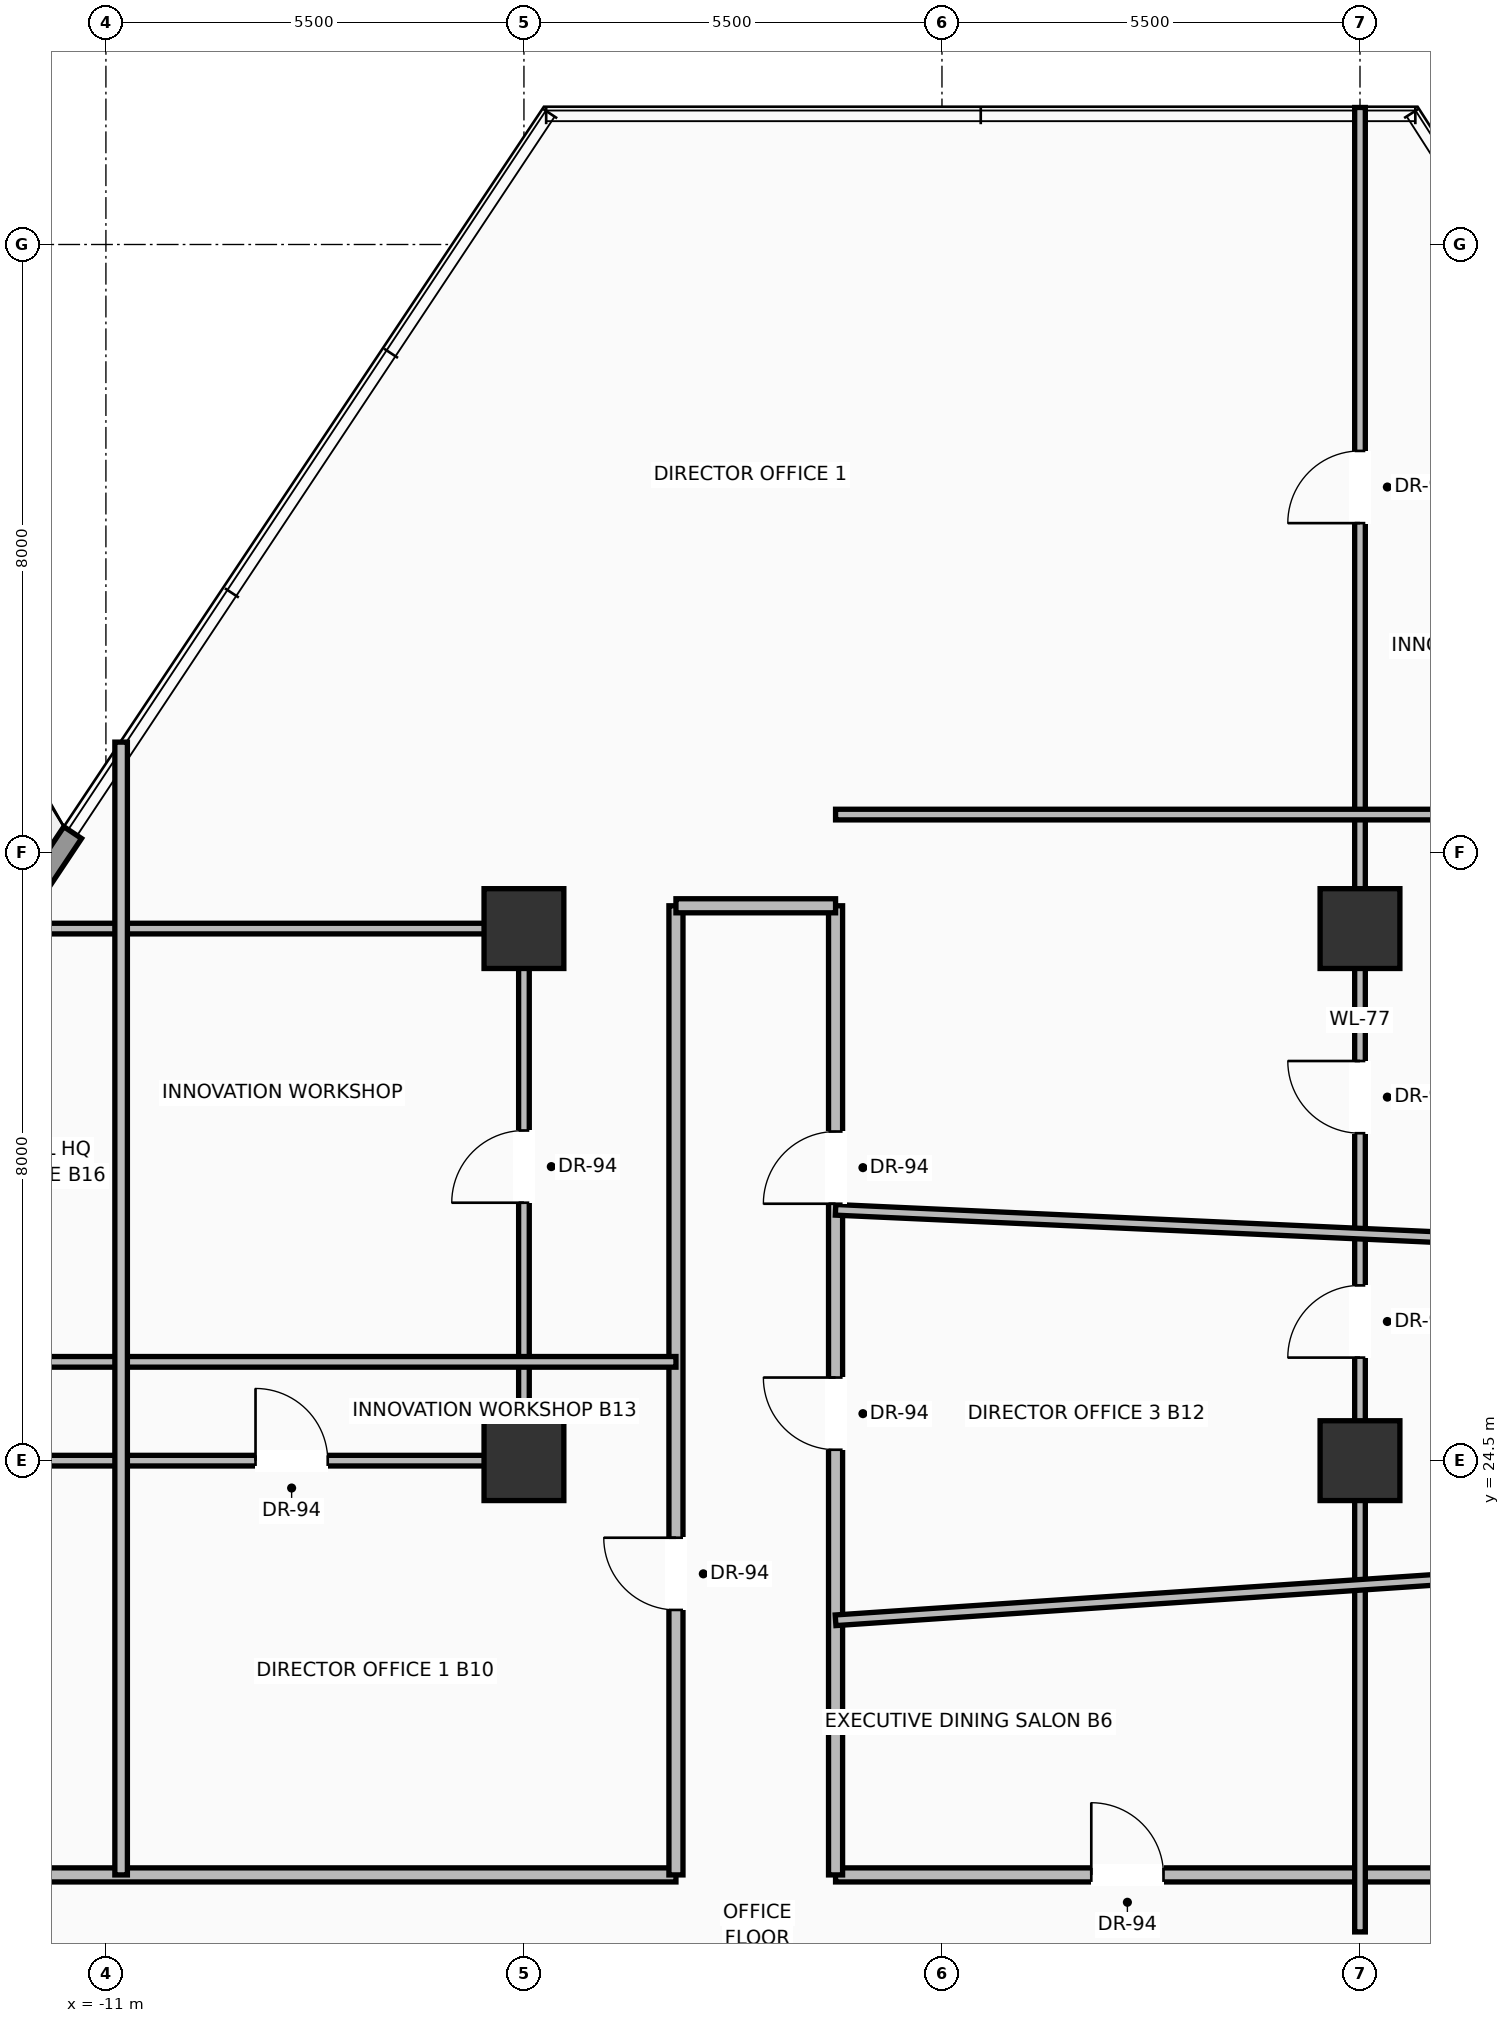
"""IFC4 building model, lengths in metres.
Left out: names, types, materials, properties, quantities, classifications, styles, units other than length and angle.
Written with IfcOpenShell. Run it as: python <this file> out.ifc"""

import sys

from ifc_helpers import new_model, si_unit, direction, frame, frame_2d, origin, origin_2d, place, context, subcontext, project, spatial, rectangle, extrude, source, transform, mapped, element, fill, save


model = new_model("IFC4")
c1 = context("Model", 3, precision=1e-05, world=origin(), true_north=direction((0.0, 1.0)))
c2 = subcontext(c1, "Body", "Model", "MODEL_VIEW")
j1 = project(units=[si_unit("LENGTHUNIT", "METRE"), si_unit("PLANEANGLEUNIT", "RADIAN")], contexts=[c1])
p1 = place(None, origin())
s1 = spatial("IfcSite", under=j1, at=p1, CompositionType="ELEMENT")
p2 = place(p1, origin())
s2 = spatial("IfcBuilding", under=s1, at=p2, CompositionType="ELEMENT")
p3 = place(p2, frame((0.0, 0.0, 109.9)))
s3 = spatial("IfcBuildingStorey", under=s2, at=p3, CompositionType="ELEMENT", Elevation=109.9)
m1 = source(origin(), c2, "Body", "SweptSolid", [
    extrude(rectangle(XDim=1.05, YDim=1.05, at=origin_2d()), origin(), (0.0, 0.0, 1.0), 3.7),
])
for number, where, z_axis, x_axis in (
    (1, (-5.5, 24.5, 0.0), (0.0, 0.0, 1.0), (1.0, 0.0, 0.0)),
    (2, (5.5, 24.5, 0.0), (0.0, 0.0, 1.0), (1.0, 0.0, 0.0)),
    (3, (-5.5, 31.5, 0.0), (0.0, 0.0, 1.0), (1.0, 0.0, 0.0)),
    (4, (5.5, 31.5, 0.0), (0.0, 0.0, 1.0), (1.0, 0.0, 0.0)),
):
    element("IfcColumn", number, at=place(p3, frame(where, z_axis=z_axis, x_axis=x_axis)), inside=s3, PredefinedType="COLUMN", context=c2, shape_type="MappedRepresentation", body=[
        mapped(m1, transform((0.0, 0.0, 0.0), scale=1.0)),
    ])
p4 = place(p3, frame((-21.363, 17.879, 0.0), z_axis=(0.0, 0.0, 1.0), x_axis=(0.554797817256, 0.831985205378, 0.0)))
e5 = element("IfcWall", 5, at=p4, inside=s3, PredefinedType="SOLIDWALL", context=c2, shape_type="SweptSolid", body=[
    extrude(rectangle(XDim=17.89, YDim=0.28, at=frame_2d((8.945, 0.0))), origin(), (0.0, 0.0, 1.0), 3.03),
])
p5 = place(p4, frame((4.294, 0.0, 0.0)))
e6 = element("IfcOpeningElement", 6, at=p5, cuts=e5, PredefinedType="OPENING", context=c2, shape_type="SweptSolid", body=[
    extrude(rectangle(XDim=1.6, YDim=2.35, at=frame_2d((0.8, 1.175))), frame((0.0, 0.15, 0.0), z_axis=(0.0, -1.0, 0.0), x_axis=(1.0, 0.0, 0.0)), (0.0, 0.0, 1.0), 0.3),
])
p6 = place(p4, frame((12.165, 0.0, 0.9)))
e7 = element("IfcOpeningElement", 7, at=p6, cuts=e5, PredefinedType="OPENING", context=c2, shape_type="SweptSolid", body=[
    extrude(rectangle(XDim=1.55, YDim=1.85, at=frame_2d((0.775, 0.925))), frame((0.0, 0.15, 0.0), z_axis=(0.0, -1.0, 0.0), x_axis=(1.0, 0.0, 0.0)), (0.0, 0.0, 1.0), 0.3),
])
p7 = place(p3, frame((-20.738, 19.05, 0.0), z_axis=(0.0, 0.0, 1.0), x_axis=(1.0, 0.0, 0.0)))
e8 = element("IfcWall", 8, at=p7, inside=s3, PredefinedType="PARTITIONING", context=c2, shape_type="SweptSolid", body=[
    extrude(rectangle(XDim=17.238, YDim=0.185, at=frame_2d((8.619, 0.0))), origin(), (0.0, 0.0, 1.0), 2.747),
])
p8 = place(p7, frame((7.316, 0.0, 0.0)))
e9 = element("IfcOpeningElement", 9, at=p8, cuts=e8, PredefinedType="OPENING", context=c2, shape_type="SweptSolid", body=[
    extrude(rectangle(XDim=0.95, YDim=2.2, at=frame_2d((0.475, 1.1))), frame((0.0, 0.103, 0.0), z_axis=(0.0, -1.0, 0.0), x_axis=(1.0, 0.0, 0.0)), (0.0, 0.0, 1.0), 0.205),
])
p9 = place(p3, frame((-1.4, 19.05, 0.0), z_axis=(0.0, 0.0, 1.0), x_axis=(1.0, 0.0, 0.0)))
e10 = element("IfcWall", 10, at=p9, inside=s3, PredefinedType="PARTITIONING", context=c2, shape_type="SweptSolid", body=[
    extrude(rectangle(XDim=22.597, YDim=0.185, at=frame_2d((11.299, 0.0))), origin(), (0.0, 0.0, 1.0), 2.747),
])
p10 = place(p9, frame((12.715, 0.0, 0.0)))
e11 = element("IfcOpeningElement", 11, at=p10, cuts=e10, PredefinedType="OPENING", context=c2, shape_type="SweptSolid", body=[
    extrude(rectangle(XDim=0.95, YDim=2.2, at=frame_2d((0.475, 1.1))), frame((0.0, 0.103, 0.0), z_axis=(0.0, -1.0, 0.0), x_axis=(1.0, 0.0, 0.0)), (0.0, 0.0, 1.0), 0.205),
])
p11 = place(p9, frame((3.365, 0.0, 0.0)))
e12 = element("IfcOpeningElement", 12, at=p11, cuts=e10, PredefinedType="OPENING", context=c2, shape_type="SweptSolid", body=[
    extrude(rectangle(XDim=0.95, YDim=2.2, at=frame_2d((0.475, 1.1))), frame((0.0, 0.103, 0.0), z_axis=(0.0, -1.0, 0.0), x_axis=(1.0, 0.0, 0.0)), (0.0, 0.0, 1.0), 0.205),
])
p12 = place(p9, frame((9.025, 0.0, 0.0)))
e13 = element("IfcOpeningElement", 13, at=p12, cuts=e10, PredefinedType="OPENING", context=c2, shape_type="SweptSolid", body=[
    extrude(rectangle(XDim=0.95, YDim=2.2, at=frame_2d((0.475, 1.1))), frame((0.0, 0.103, 0.0), z_axis=(0.0, -1.0, 0.0), x_axis=(1.0, 0.0, 0.0)), (0.0, 0.0, 1.0), 0.205),
])
p13 = place(p3, frame((-3.5, 19.05, 0.0), z_axis=(0.0, 0.0, 1.0), x_axis=(0.0, 1.0, 0.0)))
e14 = element("IfcWall", 14, at=p13, inside=s3, PredefinedType="PARTITIONING", context=c2, shape_type="SweptSolid", body=[
    extrude(rectangle(XDim=12.75, YDim=0.185, at=frame_2d((6.375, 0.0))), origin(), (0.0, 0.0, 1.0), 2.747),
])
p14 = place(p13, frame((3.486, 0.0, 0.0)))
e15 = element("IfcOpeningElement", 15, at=p14, cuts=e14, PredefinedType="OPENING", context=c2, shape_type="SweptSolid", body=[
    extrude(rectangle(XDim=0.95, YDim=2.2, at=frame_2d((0.475, 1.1))), frame((0.0, 0.103, 0.0), z_axis=(0.0, -1.0, 0.0), x_axis=(1.0, 0.0, 0.0)), (0.0, 0.0, 1.0), 0.205),
])
p15 = place(p3, frame((-1.4, 19.05, 0.0), z_axis=(0.0, 0.0, 1.0), x_axis=(0.0, 1.0, 0.0)))
e16 = element("IfcWall", 16, at=p15, inside=s3, PredefinedType="PARTITIONING", context=c2, shape_type="SweptSolid", body=[
    extrude(rectangle(XDim=12.75, YDim=0.185, at=frame_2d((6.375, 0.0))), origin(), (0.0, 0.0, 1.0), 2.747),
])
p16 = place(p15, frame((8.83, 0.0, 0.0)))
e17 = element("IfcOpeningElement", 17, at=p16, cuts=e16, PredefinedType="OPENING", context=c2, shape_type="SweptSolid", body=[
    extrude(rectangle(XDim=0.95, YDim=2.2, at=frame_2d((0.475, 1.1))), frame((0.0, 0.103, 0.0), z_axis=(0.0, -1.0, 0.0), x_axis=(1.0, 0.0, 0.0)), (0.0, 0.0, 1.0), 0.205),
])
p17 = place(p15, frame((5.594, 0.0, 0.0)))
e18 = element("IfcOpeningElement", 18, at=p17, cuts=e16, PredefinedType="OPENING", context=c2, shape_type="SweptSolid", body=[
    extrude(rectangle(XDim=0.95, YDim=2.2, at=frame_2d((0.475, 1.1))), frame((0.0, 0.103, 0.0), z_axis=(0.0, -1.0, 0.0), x_axis=(1.0, 0.0, 0.0)), (0.0, 0.0, 1.0), 0.205),
])
p18 = place(p3, frame((-3.5, 31.8, 0.0), z_axis=(0.0, 0.0, 1.0), x_axis=(1.0, 0.0, 0.0)))
e19 = element("IfcWall", 19, at=p18, inside=s3, PredefinedType="PARTITIONING", context=c2, shape_type="SweptSolid", body=[
    extrude(rectangle(XDim=2.1, YDim=0.185, at=frame_2d((1.05, 0.0))), origin(), (0.0, 0.0, 1.0), 2.747),
])
p19 = place(p3, frame((5.5, 18.3, 0.0), z_axis=(0.0, 0.0, 1.0), x_axis=(0.0, 1.0, 0.0)))
e20 = element("IfcWall", 20, at=p19, inside=s3, PredefinedType="PARTITIONING", context=c2, shape_type="SweptSolid", body=[
    extrude(rectangle(XDim=24.002, YDim=0.14, at=frame_2d((12.001, 0.0))), origin(), (0.0, 0.0, 1.0), 2.747),
])
p20 = place(p19, frame((10.508, 0.0, 0.0)))
e21 = element("IfcOpeningElement", 21, at=p20, cuts=e20, PredefinedType="OPENING", context=c2, shape_type="SweptSolid", body=[
    extrude(rectangle(XDim=0.95, YDim=2.2, at=frame_2d((0.475, 1.1))), frame((0.0, 0.08, 0.0), z_axis=(0.0, -1.0, 0.0), x_axis=(1.0, 0.0, 0.0)), (0.0, 0.0, 1.0), 0.16),
])
p21 = place(p19, frame((18.534, 0.0, 0.0)))
e22 = element("IfcOpeningElement", 22, at=p21, cuts=e20, PredefinedType="OPENING", context=c2, shape_type="SweptSolid", body=[
    extrude(rectangle(XDim=0.95, YDim=2.2, at=frame_2d((0.475, 1.1))), frame((0.0, 0.08, 0.0), z_axis=(0.0, -1.0, 0.0), x_axis=(1.0, 0.0, 0.0)), (0.0, 0.0, 1.0), 0.16),
])
p22 = place(p19, frame((7.556, 0.0, 0.0)))
e23 = element("IfcOpeningElement", 23, at=p22, cuts=e20, PredefinedType="OPENING", context=c2, shape_type="SweptSolid", body=[
    extrude(rectangle(XDim=0.95, YDim=2.2, at=frame_2d((0.475, 1.1))), frame((0.0, 0.08, 0.0), z_axis=(0.0, -1.0, 0.0), x_axis=(1.0, 0.0, 0.0)), (0.0, 0.0, 1.0), 0.16),
])
p23 = place(p3, frame((-17.104, 24.5, 0.0), z_axis=(0.0, 0.0, 1.0), x_axis=(1.0, 0.0, 0.0)))
e24 = element("IfcWall", 24, at=p23, inside=s3, PredefinedType="PARTITIONING", context=c2, shape_type="SweptSolid", body=[
    extrude(rectangle(XDim=11.604, YDim=0.14, at=frame_2d((5.802, 0.0))), origin(), (0.0, 0.0, 1.0), 2.747),
])
p24 = place(p23, frame((2.967, 0.0, 0.0)))
e25 = element("IfcOpeningElement", 25, at=p24, cuts=e24, PredefinedType="OPENING", context=c2, shape_type="SweptSolid", body=[
    extrude(rectangle(XDim=0.95, YDim=2.2, at=frame_2d((0.475, 1.1))), frame((0.0, 0.08, 0.0), z_axis=(0.0, -1.0, 0.0), x_axis=(1.0, 0.0, 0.0)), (0.0, 0.0, 1.0), 0.16),
])
p25 = place(p23, frame((8.072, 0.0, 0.0)))
e26 = element("IfcOpeningElement", 26, at=p25, cuts=e24, PredefinedType="OPENING", context=c2, shape_type="SweptSolid", body=[
    extrude(rectangle(XDim=0.95, YDim=2.2, at=frame_2d((0.475, 1.1))), frame((0.0, 0.08, 0.0), z_axis=(0.0, -1.0, 0.0), x_axis=(1.0, 0.0, 0.0)), (0.0, 0.0, 1.0), 0.16),
])
p26 = place(p3, frame((-5.5, 24.5, 0.0), z_axis=(0.0, 0.0, 1.0), x_axis=(0.0, 1.0, 0.0)))
e27 = element("IfcWall", 27, at=p26, inside=s3, PredefinedType="PARTITIONING", context=c2, shape_type="SweptSolid", body=[
    extrude(rectangle(XDim=7.0, YDim=0.14, at=frame_2d((3.5, 0.0))), origin(), (0.0, 0.0, 1.0), 2.747),
])
p27 = place(p26, frame((3.393, 0.0, 0.0)))
e28 = element("IfcOpeningElement", 28, at=p27, cuts=e27, PredefinedType="OPENING", context=c2, shape_type="SweptSolid", body=[
    extrude(rectangle(XDim=0.95, YDim=2.2, at=frame_2d((0.475, 1.1))), frame((0.0, 0.08, 0.0), z_axis=(0.0, -1.0, 0.0), x_axis=(1.0, 0.0, 0.0)), (0.0, 0.0, 1.0), 0.16),
])
p28 = place(p3, frame((-12.436, 31.5, 0.0), z_axis=(0.0, 0.0, 1.0), x_axis=(1.0, 0.0, 0.0)))
e29 = element("IfcWall", 29, at=p28, inside=s3, PredefinedType="PARTITIONING", context=c2, shape_type="SweptSolid", body=[
    extrude(rectangle(XDim=6.936, YDim=0.14, at=frame_2d((3.468, 0.0))), origin(), (0.0, 0.0, 1.0), 2.747),
])
p29 = place(p3, frame((-16.237, 25.8, 0.0), z_axis=(0.0, 0.0, 1.0), x_axis=(1.0, 0.0, 0.0)))
e30 = element("IfcWall", 30, at=p29, inside=s3, PredefinedType="PARTITIONING", context=c2, shape_type="SweptSolid", body=[
    extrude(rectangle(XDim=12.737, YDim=0.14, at=frame_2d((6.368, 0.0))), origin(), (0.0, 0.0, 1.0), 2.747),
])
p30 = place(p29, frame((2.574, 0.0, 0.0)))
e31 = element("IfcOpeningElement", 31, at=p30, cuts=e30, PredefinedType="OPENING", context=c2, shape_type="SweptSolid", body=[
    extrude(rectangle(XDim=0.95, YDim=2.2, at=frame_2d((0.475, 1.1))), frame((0.0, 0.08, 0.0), z_axis=(0.0, -1.0, 0.0), x_axis=(1.0, 0.0, 0.0)), (0.0, 0.0, 1.0), 0.16),
])
p31 = place(p3, frame((-1.4, 22.4, 0.0), z_axis=(0.0, 0.0, 1.0), x_axis=(0.997727357644, 0.067380411165, 0.0)))
e32 = element("IfcWall", 32, at=p31, inside=s3, PredefinedType="PARTITIONING", context=c2, shape_type="SweptSolid", body=[
    extrude(rectangle(XDim=19.638, YDim=0.14, at=frame_2d((9.819, 0.0))), origin(), (0.0, 0.0, 1.0), 2.747),
])
p32 = place(p31, frame((15.025, 0.0, 0.0)))
e33 = element("IfcOpeningElement", 33, at=p32, cuts=e32, PredefinedType="OPENING", context=c2, shape_type="SweptSolid", body=[
    extrude(rectangle(XDim=0.95, YDim=2.2, at=frame_2d((0.475, 1.1))), frame((0.0, 0.08, 0.0), z_axis=(0.0, -1.0, 0.0), x_axis=(1.0, 0.0, 0.0)), (0.0, 0.0, 1.0), 0.16),
])
p33 = place(p3, frame((-1.4, 27.8, 0.0), z_axis=(0.0, 0.0, 1.0), x_axis=(0.998969316616, -0.045390576782, 0.0)))
e34 = element("IfcWall", 34, at=p33, inside=s3, PredefinedType="PARTITIONING", context=c2, shape_type="SweptSolid", body=[
    extrude(rectangle(XDim=17.502, YDim=0.14, at=frame_2d((8.751, 0.0))), origin(), (0.0, 0.0, 1.0), 2.747),
])
p34 = place(p33, frame((13.905, 0.0, 0.0)))
e35 = element("IfcOpeningElement", 35, at=p34, cuts=e34, PredefinedType="OPENING", context=c2, shape_type="SweptSolid", body=[
    extrude(rectangle(XDim=0.95, YDim=2.2, at=frame_2d((0.475, 1.1))), frame((0.0, 0.08, 0.0), z_axis=(0.0, -1.0, 0.0), x_axis=(1.0, 0.0, 0.0)), (0.0, 0.0, 1.0), 0.16),
])
p35 = place(p3, frame((-1.4, 33.0, 0.0), z_axis=(0.0, 0.0, 1.0), x_axis=(1.0, 0.0, 0.0)))
e36 = element("IfcWall", 36, at=p35, inside=s3, PredefinedType="PARTITIONING", context=c2, shape_type="SweptSolid", body=[
    extrude(rectangle(XDim=13.631, YDim=0.14, at=frame_2d((6.816, 0.0))), origin(), (0.0, 0.0, 1.0), 2.747),
])
p36 = place(p3, frame((-10.8, 19.05, 0.0), z_axis=(0.0, 0.0, 1.0), x_axis=(0.0, 1.0, 0.0)))
e37 = element("IfcWall", 37, at=p36, inside=s3, PredefinedType="PARTITIONING", context=c2, shape_type="SweptSolid", body=[
    extrude(rectangle(XDim=14.903, YDim=0.165, at=frame_2d((7.452, 0.0))), origin(), (0.0, 0.0, 1.0), 2.747),
])
m2 = source(origin(), c2, "Body", "SweptSolid", [
    extrude(rectangle(XDim=0.95, YDim=2.2, at=frame_2d((0.475, 1.1))), frame((0.0, 0.025, 0.0), z_axis=(0.0, -1.0, 0.0), x_axis=(1.0, 0.0, 0.0)), (0.0, 0.0, 1.0), 0.05),
])
p37 = place(p14, origin())
e38 = element("IfcDoor", 38, at=p37, inside=s3, OperationType="SINGLE_SWING_RIGHT", PredefinedType="DOOR", context=c2, shape_type="MappedRepresentation", body=[
    mapped(m2, transform((0.0, 0.0, 0.0), scale=1.0)),
])
fill(e15, e38)
p38 = place(p16, origin())
e39 = element("IfcDoor", 39, at=p38, inside=s3, OperationType="SINGLE_SWING_LEFT", PredefinedType="DOOR", context=c2, shape_type="MappedRepresentation", body=[
    mapped(m2, transform((0.0, 0.0, 0.0), scale=1.0)),
])
fill(e17, e39)
p39 = place(p11, origin())
e40 = element("IfcDoor", 40, at=p39, inside=s3, OperationType="SINGLE_SWING_LEFT", PredefinedType="DOOR", context=c2, shape_type="MappedRepresentation", body=[
    mapped(m2, transform((0.0, 0.0, 0.0), scale=1.0)),
])
fill(e12, e40)
p40 = place(p17, origin())
e41 = element("IfcDoor", 41, at=p40, inside=s3, OperationType="SINGLE_SWING_RIGHT", PredefinedType="DOOR", context=c2, shape_type="MappedRepresentation", body=[
    mapped(m2, transform((0.0, 0.0, 0.0), scale=1.0)),
])
fill(e18, e41)
p41 = place(p25, origin())
e42 = element("IfcDoor", 42, at=p41, inside=s3, OperationType="SINGLE_SWING_LEFT", PredefinedType="DOOR", context=c2, shape_type="MappedRepresentation", body=[
    mapped(m2, transform((0.0, 0.0, 0.0), scale=1.0)),
])
fill(e26, e42)
p42 = place(p27, origin())
e43 = element("IfcDoor", 43, at=p42, inside=s3, OperationType="SINGLE_SWING_LEFT", PredefinedType="DOOR", context=c2, shape_type="MappedRepresentation", body=[
    mapped(m2, transform((0.0, 0.0, 0.0), scale=1.0)),
])
fill(e28, e43)
p43 = place(p20, origin())
e44 = element("IfcDoor", 44, at=p43, inside=s3, OperationType="SINGLE_SWING_RIGHT", PredefinedType="DOOR", context=c2, shape_type="MappedRepresentation", body=[
    mapped(m2, transform((0.0, 0.0, 0.0), scale=1.0)),
])
fill(e21, e44)
p44 = place(p21, origin())
e45 = element("IfcDoor", 45, at=p44, inside=s3, OperationType="SINGLE_SWING_LEFT", PredefinedType="DOOR", context=c2, shape_type="MappedRepresentation", body=[
    mapped(m2, transform((0.0, 0.0, 0.0), scale=1.0)),
])
fill(e22, e45)
p45 = place(p22, origin())
e46 = element("IfcDoor", 46, at=p45, inside=s3, OperationType="SINGLE_SWING_LEFT", PredefinedType="DOOR", context=c2, shape_type="MappedRepresentation", body=[
    mapped(m2, transform((0.0, 0.0, 0.0), scale=1.0)),
])
fill(e23, e46)
save(model, sys.argv[1])
